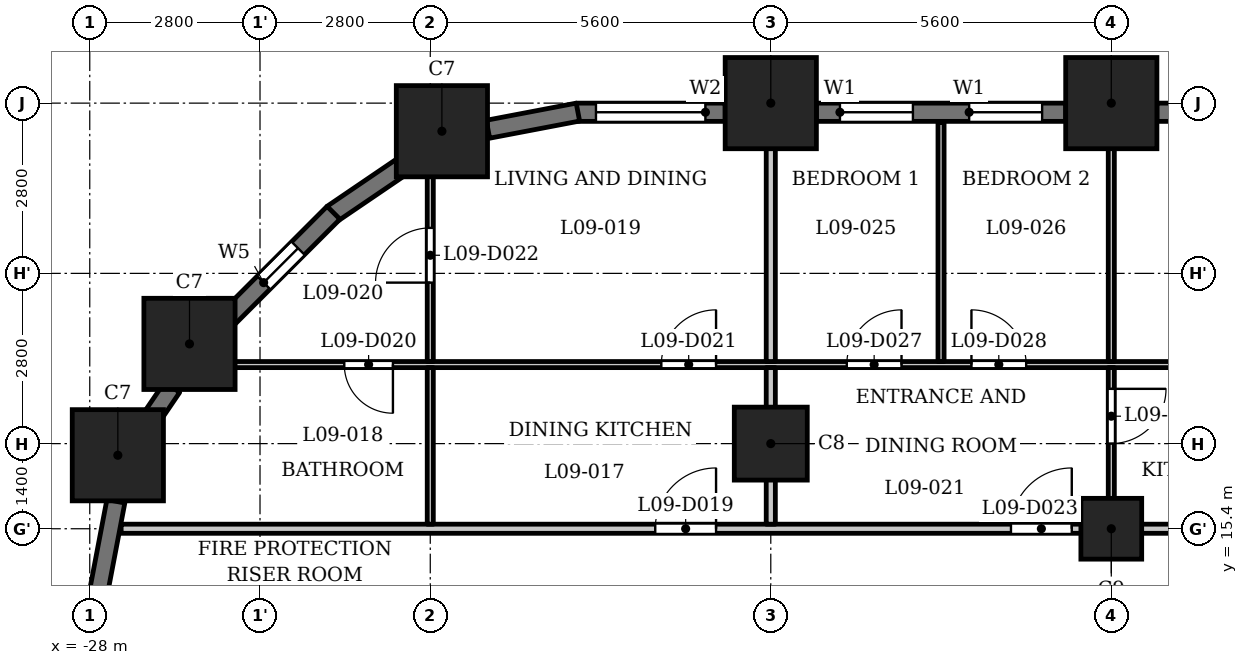
"""IFC4 building model, lengths in metres.
Left out: names, types, materials, properties, quantities, classifications, styles, units other than length and angle.
Written with IfcOpenShell. Run it as: python <this file> out.ifc"""

import sys

from ifc_helpers import new_model, si_unit, direction, frame, frame_2d, origin, origin_2d, place, context, subcontext, project, spatial, rectangle, extrude, element, fill, save


model = new_model("IFC4")
c1 = context("Model", 3, precision=1e-05, world=origin(), true_north=direction((0.0, 1.0)))
c2 = subcontext(c1, "Body", "Model", "MODEL_VIEW")
j1 = project(units=[si_unit("LENGTHUNIT", "METRE"), si_unit("PLANEANGLEUNIT", "RADIAN")], contexts=[c1])
p1 = place(None, origin())
s1 = spatial("IfcSite", under=j1, at=p1, CompositionType="ELEMENT")
p2 = place(p1, origin())
s2 = spatial("IfcBuilding", under=s1, at=p2, CompositionType="ELEMENT")
p3 = place(p2, frame((0.0, 0.0, 41.0)))
s3 = spatial("IfcBuildingStorey", under=s2, at=p3, CompositionType="ELEMENT", Elevation=41.0)
for number, where, z_axis, x_axis in (
    (1, (-11.2, 22.4, 0.0), (0.0, 0.0, 1.0), (1.0, 0.0, 0.0)),
    (2, (-16.8, 22.4, 0.0), (0.0, 0.0, 1.0), (1.0, 0.0, 0.0)),
    (3, (-22.209, 21.938, 0.0), (0.0, 0.0, 1.0), (1.0, 0.0, 0.0)),
    (4, (-26.36, 18.44, 0.0), (0.0, 0.0, 1.0), (1.0, 0.0, 0.0)),
    (5, (-27.538, 16.609, 0.0), (0.0, 0.0, 1.0), (1.0, 0.0, 0.0)),
):
    element("IfcColumn", number, at=place(p3, frame(where, z_axis=z_axis, x_axis=x_axis)), inside=s3, PredefinedType="COLUMN", context=c2, shape_type="SweptSolid", body=[
        extrude(rectangle(XDim=1.5, YDim=1.5, at=origin_2d()), origin(), (0.0, 0.0, 1.0), 3.5),
    ])
p4 = place(p3, frame((-16.8, 16.8, 0.0), z_axis=(0.0, 0.0, 1.0), x_axis=(1.0, 0.0, 0.0)))
e6 = element("IfcColumn", 6, at=p4, inside=s3, PredefinedType="COLUMN", context=c2, shape_type="SweptSolid", body=[
    extrude(rectangle(XDim=1.2, YDim=1.2, at=origin_2d()), origin(), (0.0, 0.0, 1.0), 3.5),
])
p5 = place(p3, frame((-11.2, 15.4, 0.0), z_axis=(0.0, 0.0, 1.0), x_axis=(1.0, 0.0, 0.0)))
e7 = element("IfcColumn", 7, at=p5, inside=s3, PredefinedType="COLUMN", context=c2, shape_type="SweptSolid", body=[
    extrude(rectangle(XDim=1.0, YDim=1.0, at=origin_2d()), origin(), (0.0, 0.0, 1.0), 3.5),
])
p6 = place(p3, frame((-6.35, 22.25, 0.0), z_axis=(0.0, 0.0, 1.0), x_axis=(-1.0, 0.0, 0.0)))
e8 = element("IfcWall", 8, at=p6, inside=s3, PredefinedType="SOLIDWALL", context=c2, shape_type="SweptSolid", body=[
    extrude(rectangle(XDim=4.1, YDim=0.3, at=frame_2d((2.05, 0.0))), origin(), (0.0, 0.0, 1.0), 2.35),
])
p7 = place(p6, frame((0.75, 0.0, 0.9)))
e9 = element("IfcOpeningElement", 9, at=p7, cuts=e8, PredefinedType="OPENING", context=c2, shape_type="SweptSolid", body=[
    extrude(rectangle(XDim=2.6, YDim=1.25, at=frame_2d((1.3, 0.625))), frame((0.0, 0.16, 0.0), z_axis=(0.0, -1.0, 0.0), x_axis=(1.0, 0.0, 0.0)), (0.0, 0.0, 1.0), 0.32),
])
p8 = place(p3, frame((-11.95, 22.25, 0.0), z_axis=(0.0, 0.0, 1.0), x_axis=(-1.0, 0.0, 0.0)))
e10 = element("IfcWall", 10, at=p8, inside=s3, PredefinedType="SOLIDWALL", context=c2, shape_type="SweptSolid", body=[
    extrude(rectangle(XDim=4.1, YDim=0.3, at=frame_2d((2.05, 0.0))), origin(), (0.0, 0.0, 1.0), 2.35),
])
p9 = place(p8, frame((0.387, 0.0, 0.6)))
e11 = element("IfcOpeningElement", 11, at=p9, cuts=e10, PredefinedType="OPENING", context=c2, shape_type="SweptSolid", body=[
    extrude(rectangle(XDim=1.2, YDim=1.55, at=frame_2d((0.6, 0.775))), frame((0.0, 0.16, 0.0), z_axis=(0.0, -1.0, 0.0), x_axis=(1.0, 0.0, 0.0)), (0.0, 0.0, 1.0), 0.32),
])
p10 = place(p8, frame((2.512, 0.0, 0.6)))
e12 = element("IfcOpeningElement", 12, at=p10, cuts=e10, PredefinedType="OPENING", context=c2, shape_type="SweptSolid", body=[
    extrude(rectangle(XDim=1.2, YDim=1.55, at=frame_2d((0.6, 0.775))), frame((0.0, 0.16, 0.0), z_axis=(0.0, -1.0, 0.0), x_axis=(1.0, 0.0, 0.0)), (0.0, 0.0, 1.0), 0.32),
])
p11 = place(p3, frame((-17.55, 22.25, 0.0), z_axis=(0.0, 0.0, 1.0), x_axis=(-1.0, 0.0, 0.0)))
e13 = element("IfcWall", 13, at=p11, inside=s3, PredefinedType="SOLIDWALL", context=c2, shape_type="SweptSolid", body=[
    extrude(rectangle(XDim=2.45, YDim=0.3, at=frame_2d((1.225, 0.0))), origin(), (0.0, 0.0, 1.0), 2.35),
])
p12 = place(p11, frame((0.325, 0.0, 0.9)))
e14 = element("IfcOpeningElement", 14, at=p12, cuts=e13, PredefinedType="OPENING", context=c2, shape_type="SweptSolid", body=[
    extrude(rectangle(XDim=1.8, YDim=1.25, at=frame_2d((0.9, 0.625))), frame((0.0, 0.16, 0.0), z_axis=(0.0, -1.0, 0.0), x_axis=(1.0, 0.0, 0.0)), (0.0, 0.0, 1.0), 0.32),
])
for number, where, z_axis, x_axis in (
    (15, (-19.972, 22.253, 0.0), (0.0, 0.0, 1.0), (-0.982, -0.187, 0.0)),
    (16, (-22.767, 21.426, 0.0), (0.0, 0.0, 1.0), (-0.827, -0.562, 0.0)),
):
    element("IfcWall", number, at=place(p3, frame(where, z_axis=z_axis, x_axis=x_axis)), inside=s3, PredefinedType="SOLIDWALL", context=c2, shape_type="SweptSolid", body=[
        extrude(rectangle(XDim=1.506, YDim=0.3, at=frame_2d((0.753, 0.0))), origin(), (0.0, 0.0, 1.0), 2.35),
    ])
p13 = place(p3, frame((-23.991, 20.597, 0.0), z_axis=(0.0, 0.0, 1.0), x_axis=(-0.707106781187, -0.707106781187, 0.0)))
e17 = element("IfcWall", 17, at=p13, inside=s3, PredefinedType="SOLIDWALL", context=c2, shape_type="SweptSolid", body=[
    extrude(rectangle(XDim=2.45, YDim=0.3, at=frame_2d((1.225, 0.0))), origin(), (0.0, 0.0, 1.0), 2.35),
])
p14 = place(p13, frame((0.825, 0.0, 0.6)))
e18 = element("IfcOpeningElement", 18, at=p14, cuts=e17, PredefinedType="OPENING", context=c2, shape_type="SweptSolid", body=[
    extrude(rectangle(XDim=0.8, YDim=1.55, at=frame_2d((0.4, 0.775))), frame((0.0, 0.16, 0.0), z_axis=(0.0, -1.0, 0.0), x_axis=(1.0, 0.0, 0.0)), (0.0, 0.0, 1.0), 0.32),
])
p15 = place(p3, frame((-26.645, 17.727, 0.0), z_axis=(0.0, 0.0, 1.0), x_axis=(-0.562083182981, -0.827080706709, 0.0)))
e19 = element("IfcWall", 19, at=p15, inside=s3, PredefinedType="SOLIDWALL", context=c2, shape_type="SweptSolid", body=[
    extrude(rectangle(XDim=0.677, YDim=0.3, at=frame_2d((0.339, 0.0))), origin(), (0.0, 0.0, 1.0), 3.2),
])
p16 = place(p3, frame((-27.571, 15.851, 0.0), z_axis=(0.0, 0.0, 1.0), x_axis=(-0.187223837635, -0.982317277982, 0.0)))
e20 = element("IfcWall", 20, at=p16, inside=s3, PredefinedType="SOLIDWALL", context=c2, shape_type="SweptSolid", body=[
    extrude(rectangle(XDim=1.506, YDim=0.3, at=frame_2d((0.753, 0.0))), origin(), (0.0, 0.0, 1.0), 2.35),
])
p17 = place(p3, frame((-27.484, 15.4, 0.0), z_axis=(0.0, 0.0, 1.0), x_axis=(1.0, 0.0, 0.0)))
e21 = element("IfcWall", 21, at=p17, inside=s3, PredefinedType="PARTITIONING", context=c2, shape_type="SweptSolid", body=[
    extrude(rectangle(XDim=54.968, YDim=0.15, at=frame_2d((27.484, 0.0))), origin(), (0.0, 0.0, 1.0), 3.2),
])
p18 = place(p17, frame((8.784, 0.0, 0.0)))
e22 = element("IfcOpeningElement", 22, at=p18, cuts=e21, PredefinedType="OPENING", context=c2, shape_type="SweptSolid", body=[
    extrude(rectangle(XDim=1.0, YDim=2.1, at=frame_2d((0.5, 1.05))), frame((0.0, 0.085, 0.0), z_axis=(0.0, -1.0, 0.0), x_axis=(1.0, 0.0, 0.0)), (0.0, 0.0, 1.0), 0.17),
])
p19 = place(p17, frame((14.634, 0.0, 0.0)))
e23 = element("IfcOpeningElement", 23, at=p19, cuts=e21, PredefinedType="OPENING", context=c2, shape_type="SweptSolid", body=[
    extrude(rectangle(XDim=1.0, YDim=2.1, at=frame_2d((0.5, 1.05))), frame((0.0, 0.085, 0.0), z_axis=(0.0, -1.0, 0.0), x_axis=(1.0, 0.0, 0.0)), (0.0, 0.0, 1.0), 0.17),
])
p20 = place(p17, frame((25.834, 0.0, 0.0)))
e24 = element("IfcOpeningElement", 24, at=p20, cuts=e21, PredefinedType="OPENING", context=c2, shape_type="SweptSolid", body=[
    extrude(rectangle(XDim=1.0, YDim=2.1, at=frame_2d((0.5, 1.05))), frame((0.0, 0.085, 0.0), z_axis=(0.0, -1.0, 0.0), x_axis=(1.0, 0.0, 0.0)), (0.0, 0.0, 1.0), 0.17),
])
p21 = place(p17, frame((30.184, 0.0, 0.0)))
e25 = element("IfcOpeningElement", 25, at=p21, cuts=e21, PredefinedType="OPENING", context=c2, shape_type="SweptSolid", body=[
    extrude(rectangle(XDim=1.0, YDim=2.1, at=frame_2d((0.5, 1.05))), frame((0.0, 0.085, 0.0), z_axis=(0.0, -1.0, 0.0), x_axis=(1.0, 0.0, 0.0)), (0.0, 0.0, 1.0), 0.17),
])
p22 = place(p17, frame((37.034, 0.0, 0.0)))
e26 = element("IfcOpeningElement", 26, at=p22, cuts=e21, PredefinedType="OPENING", context=c2, shape_type="SweptSolid", body=[
    extrude(rectangle(XDim=1.0, YDim=2.1, at=frame_2d((0.5, 1.05))), frame((0.0, 0.085, 0.0), z_axis=(0.0, -1.0, 0.0), x_axis=(1.0, 0.0, 0.0)), (0.0, 0.0, 1.0), 0.17),
])
p23 = place(p17, frame((48.234, 0.0, 0.0)))
e27 = element("IfcOpeningElement", 27, at=p23, cuts=e21, PredefinedType="OPENING", context=c2, shape_type="SweptSolid", body=[
    extrude(rectangle(XDim=1.0, YDim=2.1, at=frame_2d((0.5, 1.05))), frame((0.0, 0.085, 0.0), z_axis=(0.0, -1.0, 0.0), x_axis=(1.0, 0.0, 0.0)), (0.0, 0.0, 1.0), 0.17),
])
p24 = place(p3, frame((-26.44, 18.1, 0.0), z_axis=(0.0, 0.0, 1.0), x_axis=(1.0, 0.0, 0.0)))
e28 = element("IfcWall", 28, at=p24, inside=s3, PredefinedType="PARTITIONING", context=c2, shape_type="SweptSolid", body=[
    extrude(rectangle(XDim=52.63, YDim=0.1, at=frame_2d((26.315, 0.0))), origin(), (0.0, 0.0, 1.0), 3.2),
])
p25 = place(p24, frame((2.626, 0.0, 0.0)))
e29 = element("IfcOpeningElement", 29, at=p25, cuts=e28, PredefinedType="OPENING", context=c2, shape_type="SweptSolid", body=[
    extrude(rectangle(XDim=0.8, YDim=2.1, at=frame_2d((0.4, 1.05))), frame((0.0, 0.06, 0.0), z_axis=(0.0, -1.0, 0.0), x_axis=(1.0, 0.0, 0.0)), (0.0, 0.0, 1.0), 0.12),
])
p26 = place(p24, frame((7.84, 0.0, 0.0)))
e30 = element("IfcOpeningElement", 30, at=p26, cuts=e28, PredefinedType="OPENING", context=c2, shape_type="SweptSolid", body=[
    extrude(rectangle(XDim=0.9, YDim=2.1, at=frame_2d((0.45, 1.05))), frame((0.0, 0.06, 0.0), z_axis=(0.0, -1.0, 0.0), x_axis=(1.0, 0.0, 0.0)), (0.0, 0.0, 1.0), 0.12),
])
p27 = place(p24, frame((18.49, 0.0, 0.0)))
e31 = element("IfcOpeningElement", 31, at=p27, cuts=e28, PredefinedType="OPENING", context=c2, shape_type="SweptSolid", body=[
    extrude(rectangle(XDim=0.8, YDim=2.1, at=frame_2d((0.4, 1.05))), frame((0.0, 0.06, 0.0), z_axis=(0.0, -1.0, 0.0), x_axis=(1.0, 0.0, 0.0)), (0.0, 0.0, 1.0), 0.12),
])
p28 = place(p24, frame((16.54, 0.0, 0.0)))
e32 = element("IfcOpeningElement", 32, at=p28, cuts=e28, PredefinedType="OPENING", context=c2, shape_type="SweptSolid", body=[
    extrude(rectangle(XDim=0.9, YDim=2.1, at=frame_2d((0.45, 1.05))), frame((0.0, 0.06, 0.0), z_axis=(0.0, -1.0, 0.0), x_axis=(1.0, 0.0, 0.0)), (0.0, 0.0, 1.0), 0.12),
])
p29 = place(p24, frame((10.89, 0.0, 0.0)))
e33 = element("IfcOpeningElement", 33, at=p29, cuts=e28, PredefinedType="OPENING", context=c2, shape_type="SweptSolid", body=[
    extrude(rectangle(XDim=0.9, YDim=2.1, at=frame_2d((0.45, 1.05))), frame((0.0, 0.06, 0.0), z_axis=(0.0, -1.0, 0.0), x_axis=(1.0, 0.0, 0.0)), (0.0, 0.0, 1.0), 0.12),
])
p30 = place(p24, frame((12.94, 0.0, 0.0)))
e34 = element("IfcOpeningElement", 34, at=p30, cuts=e28, PredefinedType="OPENING", context=c2, shape_type="SweptSolid", body=[
    extrude(rectangle(XDim=0.9, YDim=2.1, at=frame_2d((0.45, 1.05))), frame((0.0, 0.06, 0.0), z_axis=(0.0, -1.0, 0.0), x_axis=(1.0, 0.0, 0.0)), (0.0, 0.0, 1.0), 0.12),
])
p31 = place(p24, frame((21.49, 0.0, 0.0)))
e35 = element("IfcOpeningElement", 35, at=p31, cuts=e28, PredefinedType="OPENING", context=c2, shape_type="SweptSolid", body=[
    extrude(rectangle(XDim=0.8, YDim=2.1, at=frame_2d((0.4, 1.05))), frame((0.0, 0.06, 0.0), z_axis=(0.0, -1.0, 0.0), x_axis=(1.0, 0.0, 0.0)), (0.0, 0.0, 1.0), 0.12),
])
p32 = place(p24, frame((24.89, 0.0, 0.0)))
e36 = element("IfcOpeningElement", 36, at=p32, cuts=e28, PredefinedType="OPENING", context=c2, shape_type="SweptSolid", body=[
    extrude(rectangle(XDim=0.9, YDim=2.1, at=frame_2d((0.45, 1.05))), frame((0.0, 0.06, 0.0), z_axis=(0.0, -1.0, 0.0), x_axis=(1.0, 0.0, 0.0)), (0.0, 0.0, 1.0), 0.12),
])
p33 = place(p24, frame((27.09, 0.0, 0.0)))
e37 = element("IfcOpeningElement", 37, at=p33, cuts=e28, PredefinedType="OPENING", context=c2, shape_type="SweptSolid", body=[
    extrude(rectangle(XDim=0.8, YDim=2.1, at=frame_2d((0.4, 1.05))), frame((0.0, 0.06, 0.0), z_axis=(0.0, -1.0, 0.0), x_axis=(1.0, 0.0, 0.0)), (0.0, 0.0, 1.0), 0.12),
])
p34 = place(p24, frame((28.99, 0.0, 0.0)))
e38 = element("IfcOpeningElement", 38, at=p34, cuts=e28, PredefinedType="OPENING", context=c2, shape_type="SweptSolid", body=[
    extrude(rectangle(XDim=0.9, YDim=2.1, at=frame_2d((0.45, 1.05))), frame((0.0, 0.06, 0.0), z_axis=(0.0, -1.0, 0.0), x_axis=(1.0, 0.0, 0.0)), (0.0, 0.0, 1.0), 0.12),
])
p35 = place(p24, frame((41.69, 0.0, 0.0)))
e39 = element("IfcOpeningElement", 39, at=p35, cuts=e28, PredefinedType="OPENING", context=c2, shape_type="SweptSolid", body=[
    extrude(rectangle(XDim=0.8, YDim=2.1, at=frame_2d((0.4, 1.05))), frame((0.0, 0.06, 0.0), z_axis=(0.0, -1.0, 0.0), x_axis=(1.0, 0.0, 0.0)), (0.0, 0.0, 1.0), 0.12),
])
p36 = place(p24, frame((38.99, 0.0, 0.0)))
e40 = element("IfcOpeningElement", 40, at=p36, cuts=e28, PredefinedType="OPENING", context=c2, shape_type="SweptSolid", body=[
    extrude(rectangle(XDim=0.9, YDim=2.1, at=frame_2d((0.45, 1.05))), frame((0.0, 0.06, 0.0), z_axis=(0.0, -1.0, 0.0), x_axis=(1.0, 0.0, 0.0)), (0.0, 0.0, 1.0), 0.12),
])
p37 = place(p24, frame((33.29, 0.0, 0.0)))
e41 = element("IfcOpeningElement", 41, at=p37, cuts=e28, PredefinedType="OPENING", context=c2, shape_type="SweptSolid", body=[
    extrude(rectangle(XDim=0.9, YDim=2.1, at=frame_2d((0.45, 1.05))), frame((0.0, 0.06, 0.0), z_axis=(0.0, -1.0, 0.0), x_axis=(1.0, 0.0, 0.0)), (0.0, 0.0, 1.0), 0.12),
])
p38 = place(p24, frame((35.34, 0.0, 0.0)))
e42 = element("IfcOpeningElement", 42, at=p38, cuts=e28, PredefinedType="OPENING", context=c2, shape_type="SweptSolid", body=[
    extrude(rectangle(XDim=0.9, YDim=2.1, at=frame_2d((0.45, 1.05))), frame((0.0, 0.06, 0.0), z_axis=(0.0, -1.0, 0.0), x_axis=(1.0, 0.0, 0.0)), (0.0, 0.0, 1.0), 0.12),
])
p39 = place(p24, frame((50.74, 0.0, 0.0)))
e43 = element("IfcOpeningElement", 43, at=p39, cuts=e28, PredefinedType="OPENING", context=c2, shape_type="SweptSolid", body=[
    extrude(rectangle(XDim=0.8, YDim=2.1, at=frame_2d((0.4, 1.05))), frame((0.0, 0.06, 0.0), z_axis=(0.0, -1.0, 0.0), x_axis=(1.0, 0.0, 0.0)), (0.0, 0.0, 1.0), 0.12),
])
p40 = place(p24, frame((47.29, 0.0, 0.0)))
e44 = element("IfcOpeningElement", 44, at=p40, cuts=e28, PredefinedType="OPENING", context=c2, shape_type="SweptSolid", body=[
    extrude(rectangle(XDim=0.9, YDim=2.1, at=frame_2d((0.45, 1.05))), frame((0.0, 0.06, 0.0), z_axis=(0.0, -1.0, 0.0), x_axis=(1.0, 0.0, 0.0)), (0.0, 0.0, 1.0), 0.12),
])
p41 = place(p3, frame((-22.4, 15.475, 0.0), z_axis=(0.0, 0.0, 1.0), x_axis=(0.0, 1.0, 0.0)))
e45 = element("IfcWall", 45, at=p41, inside=s3, PredefinedType="PARTITIONING", context=c2, shape_type="SweptSolid", body=[
    extrude(rectangle(XDim=2.575, YDim=0.1, at=frame_2d((1.288, 0.0))), origin(), (0.0, 0.0, 1.0), 3.2),
])
p42 = place(p3, frame((-22.4, 18.15, 0.0), z_axis=(0.0, 0.0, 1.0), x_axis=(0.0, 1.0, 0.0)))
e46 = element("IfcWall", 46, at=p42, inside=s3, PredefinedType="PARTITIONING", context=c2, shape_type="SweptSolid", body=[
    extrude(rectangle(XDim=3.57, YDim=0.1, at=frame_2d((1.785, 0.0))), origin(), (0.0, 0.0, 1.0), 3.2),
])
p43 = place(p42, frame((1.298, 0.0, 0.0)))
e47 = element("IfcOpeningElement", 47, at=p43, cuts=e46, PredefinedType="OPENING", context=c2, shape_type="SweptSolid", body=[
    extrude(rectangle(XDim=0.9, YDim=2.1, at=frame_2d((0.45, 1.05))), frame((0.0, 0.06, 0.0), z_axis=(0.0, -1.0, 0.0), x_axis=(1.0, 0.0, 0.0)), (0.0, 0.0, 1.0), 0.12),
])
p44 = place(p3, frame((-16.8, 15.475, 0.0), z_axis=(0.0, 0.0, 1.0), x_axis=(0.0, 1.0, 0.0)))
e48 = element("IfcWall", 48, at=p44, inside=s3, PredefinedType="PARTITIONING", context=c2, shape_type="SweptSolid", body=[
    extrude(rectangle(XDim=2.575, YDim=0.15, at=frame_2d((1.288, 0.0))), origin(), (0.0, 0.0, 1.0), 3.2),
])
p45 = place(p3, frame((-16.8, 18.15, 0.0), z_axis=(0.0, 0.0, 1.0), x_axis=(0.0, 1.0, 0.0)))
e49 = element("IfcWall", 49, at=p45, inside=s3, PredefinedType="PARTITIONING", context=c2, shape_type="SweptSolid", body=[
    extrude(rectangle(XDim=4.98, YDim=0.15, at=frame_2d((2.49, 0.0))), origin(), (0.0, 0.0, 1.0), 3.2),
])
p46 = place(p3, frame((-14.0, 18.15, 0.0), z_axis=(0.0, 0.0, 1.0), x_axis=(0.0, 1.0, 0.0)))
e50 = element("IfcWall", 50, at=p46, inside=s3, PredefinedType="PARTITIONING", context=c2, shape_type="SweptSolid", body=[
    extrude(rectangle(XDim=3.93, YDim=0.1, at=frame_2d((1.965, 0.0))), origin(), (0.0, 0.0, 1.0), 3.2),
])
p47 = place(p3, frame((-11.2, 15.475, 0.0), z_axis=(0.0, 0.0, 1.0), x_axis=(0.0, 1.0, 0.0)))
e51 = element("IfcWall", 51, at=p47, inside=s3, PredefinedType="PARTITIONING", context=c2, shape_type="SweptSolid", body=[
    extrude(rectangle(XDim=2.575, YDim=0.1, at=frame_2d((1.288, 0.0))), origin(), (0.0, 0.0, 1.0), 3.2),
])
p48 = place(p47, frame((1.326, 0.0, 0.0)))
e52 = element("IfcOpeningElement", 52, at=p48, cuts=e51, PredefinedType="OPENING", context=c2, shape_type="SweptSolid", body=[
    extrude(rectangle(XDim=0.9, YDim=2.1, at=frame_2d((0.45, 1.05))), frame((0.0, 0.06, 0.0), z_axis=(0.0, -1.0, 0.0), x_axis=(1.0, 0.0, 0.0)), (0.0, 0.0, 1.0), 0.12),
])
p49 = place(p3, frame((-11.2, 18.15, 0.0), z_axis=(0.0, 0.0, 1.0), x_axis=(0.0, 1.0, 0.0)))
e53 = element("IfcWall", 53, at=p49, inside=s3, PredefinedType="PARTITIONING", context=c2, shape_type="SweptSolid", body=[
    extrude(rectangle(XDim=4.98, YDim=0.1, at=frame_2d((2.49, 0.0))), origin(), (0.0, 0.0, 1.0), 3.2),
])
p50 = place(p18, origin())
e54 = element("IfcDoor", 54, at=p50, inside=s3, OperationType="SINGLE_SWING_LEFT", PredefinedType="DOOR", context=c2, shape_type="SweptSolid", body=[
    extrude(rectangle(XDim=1.0, YDim=2.1, at=frame_2d((0.5, 1.05))), frame((0.0, 0.025, 0.0), z_axis=(0.0, -1.0, 0.0), x_axis=(1.0, 0.0, 0.0)), (0.0, 0.0, 1.0), 0.05),
])
fill(e22, e54)
p51 = place(p25, origin())
e55 = element("IfcDoor", 55, at=p51, inside=s3, OperationType="SINGLE_SWING_RIGHT", PredefinedType="DOOR", context=c2, shape_type="SweptSolid", body=[
    extrude(rectangle(XDim=0.8, YDim=2.1, at=frame_2d((0.4, 1.05))), frame((0.0, 0.025, 0.0), z_axis=(0.0, -1.0, 0.0), x_axis=(1.0, 0.0, 0.0)), (0.0, 0.0, 1.0), 0.05),
])
fill(e29, e55)
p52 = place(p26, origin())
e56 = element("IfcDoor", 56, at=p52, inside=s3, OperationType="SINGLE_SWING_LEFT", PredefinedType="DOOR", context=c2, shape_type="SweptSolid", body=[
    extrude(rectangle(XDim=0.9, YDim=2.1, at=frame_2d((0.45, 1.05))), frame((0.0, 0.025, 0.0), z_axis=(0.0, -1.0, 0.0), x_axis=(1.0, 0.0, 0.0)), (0.0, 0.0, 1.0), 0.05),
])
fill(e30, e56)
p53 = place(p43, origin())
e57 = element("IfcDoor", 57, at=p53, inside=s3, OperationType="SINGLE_SWING_RIGHT", PredefinedType="DOOR", context=c2, shape_type="SweptSolid", body=[
    extrude(rectangle(XDim=0.9, YDim=2.1, at=frame_2d((0.45, 1.05))), frame((0.0, 0.025, 0.0), z_axis=(0.0, -1.0, 0.0), x_axis=(1.0, 0.0, 0.0)), (0.0, 0.0, 1.0), 0.05),
])
fill(e47, e57)
p54 = place(p19, origin())
e58 = element("IfcDoor", 58, at=p54, inside=s3, OperationType="SINGLE_SWING_LEFT", PredefinedType="DOOR", context=c2, shape_type="SweptSolid", body=[
    extrude(rectangle(XDim=1.0, YDim=2.1, at=frame_2d((0.5, 1.05))), frame((0.0, 0.025, 0.0), z_axis=(0.0, -1.0, 0.0), x_axis=(1.0, 0.0, 0.0)), (0.0, 0.0, 1.0), 0.05),
])
fill(e23, e58)
p55 = place(p48, origin())
e59 = element("IfcDoor", 59, at=p55, inside=s3, OperationType="SINGLE_SWING_RIGHT", PredefinedType="DOOR", context=c2, shape_type="SweptSolid", body=[
    extrude(rectangle(XDim=0.9, YDim=2.1, at=frame_2d((0.45, 1.05))), frame((0.0, 0.025, 0.0), z_axis=(0.0, -1.0, 0.0), x_axis=(1.0, 0.0, 0.0)), (0.0, 0.0, 1.0), 0.05),
])
fill(e52, e59)
p56 = place(p29, origin())
e60 = element("IfcDoor", 60, at=p56, inside=s3, OperationType="SINGLE_SWING_LEFT", PredefinedType="DOOR", context=c2, shape_type="SweptSolid", body=[
    extrude(rectangle(XDim=0.9, YDim=2.1, at=frame_2d((0.45, 1.05))), frame((0.0, 0.025, 0.0), z_axis=(0.0, -1.0, 0.0), x_axis=(1.0, 0.0, 0.0)), (0.0, 0.0, 1.0), 0.05),
])
fill(e33, e60)
p57 = place(p30, origin())
e61 = element("IfcDoor", 61, at=p57, inside=s3, OperationType="SINGLE_SWING_RIGHT", PredefinedType="DOOR", context=c2, shape_type="SweptSolid", body=[
    extrude(rectangle(XDim=0.9, YDim=2.1, at=frame_2d((0.45, 1.05))), frame((0.0, 0.025, 0.0), z_axis=(0.0, -1.0, 0.0), x_axis=(1.0, 0.0, 0.0)), (0.0, 0.0, 1.0), 0.05),
])
fill(e34, e61)
p58 = place(p9, origin())
e62 = element("IfcWindow", 62, at=p58, inside=s3, PartitioningType="SINGLE_PANEL", PredefinedType="WINDOW", context=c2, shape_type="SweptSolid", body=[
    extrude(rectangle(XDim=1.2, YDim=1.55, at=frame_2d((0.6, 0.775))), frame((0.0, 0.03, 0.0), z_axis=(0.0, -1.0, 0.0), x_axis=(1.0, 0.0, 0.0)), (0.0, 0.0, 1.0), 0.06),
])
fill(e11, e62)
p59 = place(p10, origin())
e63 = element("IfcWindow", 63, at=p59, inside=s3, PartitioningType="SINGLE_PANEL", PredefinedType="WINDOW", context=c2, shape_type="SweptSolid", body=[
    extrude(rectangle(XDim=1.2, YDim=1.55, at=frame_2d((0.6, 0.775))), frame((0.0, 0.03, 0.0), z_axis=(0.0, -1.0, 0.0), x_axis=(1.0, 0.0, 0.0)), (0.0, 0.0, 1.0), 0.06),
])
fill(e12, e63)
p60 = place(p12, origin())
e64 = element("IfcWindow", 64, at=p60, inside=s3, PartitioningType="SINGLE_PANEL", PredefinedType="WINDOW", context=c2, shape_type="SweptSolid", body=[
    extrude(rectangle(XDim=1.8, YDim=1.25, at=frame_2d((0.9, 0.625))), frame((0.0, 0.03, 0.0), z_axis=(0.0, -1.0, 0.0), x_axis=(1.0, 0.0, 0.0)), (0.0, 0.0, 1.0), 0.06),
])
fill(e14, e64)
p61 = place(p14, origin())
e65 = element("IfcWindow", 65, at=p61, inside=s3, PartitioningType="SINGLE_PANEL", PredefinedType="WINDOW", context=c2, shape_type="SweptSolid", body=[
    extrude(rectangle(XDim=0.8, YDim=1.55, at=frame_2d((0.4, 0.775))), frame((0.0, 0.03, 0.0), z_axis=(0.0, -1.0, 0.0), x_axis=(1.0, 0.0, 0.0)), (0.0, 0.0, 1.0), 0.06),
])
fill(e18, e65)
save(model, sys.argv[1])
